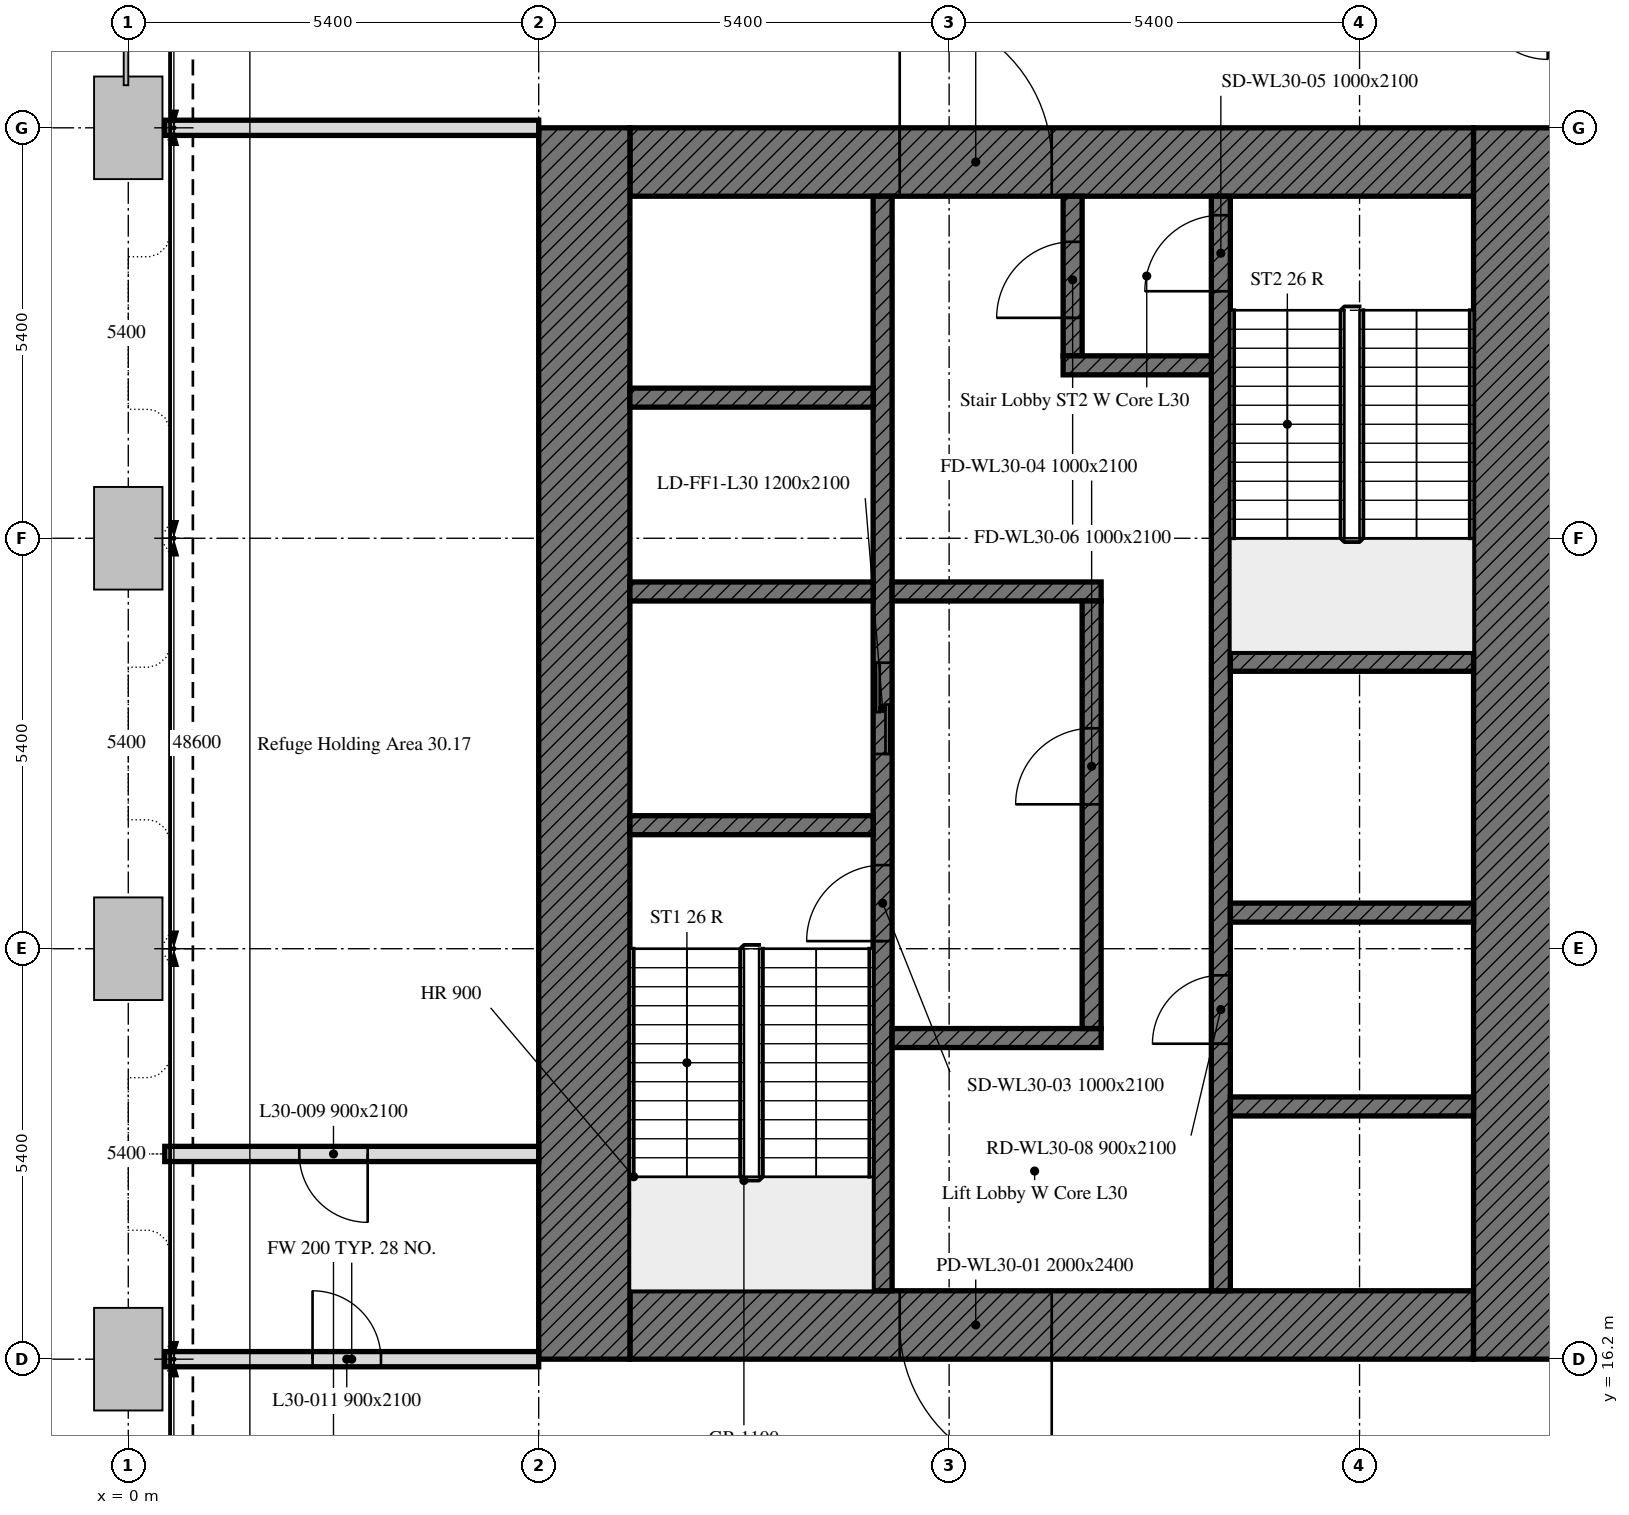
"""IFC4 building model, lengths in metres.
Left out: names, types, materials, properties, quantities, classifications, styles, units other than length and angle.
Written with IfcOpenShell. Run it as: python <this file> out.ifc"""

import sys

from ifc_helpers import new_model, si_unit, direction, frame, frame_2d, origin, place, context, subcontext, project, spatial, rectangle, extrude, element, fill, save


model = new_model("IFC4")
c1 = context("Model", 3, precision=1e-05, world=origin(), true_north=direction((0.0, 1.0)))
c2 = subcontext(c1, "Body", "Model", "MODEL_VIEW")
j1 = project(units=[si_unit("LENGTHUNIT", "METRE"), si_unit("PLANEANGLEUNIT", "RADIAN")], contexts=[c1])
p1 = place(None, origin())
s1 = spatial("IfcSite", under=j1, at=p1, CompositionType="ELEMENT")
p2 = place(p1, origin())
s2 = spatial("IfcBuilding", under=s1, at=p2, CompositionType="ELEMENT")
p3 = place(p2, frame((0.0, 0.0, 125.8)))
s3 = spatial("IfcBuildingStorey", under=s2, at=p3, CompositionType="ELEMENT", Elevation=125.8)
p4 = place(p3, frame((17.7, 16.65, 0.0), z_axis=(0.0, 0.0, 1.0), x_axis=(-1.0, 0.0, 0.0)))
e1 = element("IfcWall", 1, at=p4, inside=s3, PredefinedType="SOLIDWALL", context=c2, shape_type="SweptSolid", body=[
    extrude(rectangle(XDim=11.1, YDim=0.9, at=frame_2d((5.55, 0.0))), origin(), (0.0, 0.0, 1.0), 4.5),
])
p5 = place(p4, frame((5.55, 0.0, 0.0)))
e2 = element("IfcOpeningElement", 2, at=p5, cuts=e1, PredefinedType="OPENING", context=c2, shape_type="SweptSolid", body=[
    extrude(rectangle(XDim=2.0, YDim=2.4, at=frame_2d((1.0, 1.2))), frame((0.0, 0.45, 0.0), z_axis=(0.0, -1.0, 0.0), x_axis=(1.0, 0.0, 0.0)), (0.0, 0.0, 1.0), 0.9),
])
p6 = place(p3, frame((6.6, 31.95, 0.0), z_axis=(0.0, 0.0, 1.0), x_axis=(1.0, 0.0, 0.0)))
e3 = element("IfcWall", 3, at=p6, inside=s3, PredefinedType="SOLIDWALL", context=c2, shape_type="SweptSolid", body=[
    extrude(rectangle(XDim=11.1, YDim=0.9, at=frame_2d((5.55, 0.0))), origin(), (0.0, 0.0, 1.0), 4.5),
])
p7 = place(p6, frame((3.55, 0.0, 0.0)))
e4 = element("IfcOpeningElement", 4, at=p7, cuts=e3, PredefinedType="OPENING", context=c2, shape_type="SweptSolid", body=[
    extrude(rectangle(XDim=2.0, YDim=2.4, at=frame_2d((1.0, 1.2))), frame((0.0, 0.45, 0.0), z_axis=(0.0, -1.0, 0.0), x_axis=(1.0, 0.0, 0.0)), (0.0, 0.0, 1.0), 0.9),
])
for number, where, z_axis, x_axis in (
    (5, (6.0, 16.2, 0.0), (0.0, 0.0, 1.0), (0.0, 1.0, 0.0)),
    (6, (18.3, 32.4, 0.0), (0.0, 0.0, 1.0), (0.0, -1.0, 0.0)),
):
    element("IfcWall", number, at=place(p3, frame(where, z_axis=z_axis, x_axis=x_axis)), inside=s3, PredefinedType="SOLIDWALL", context=c2, shape_type="SweptSolid", body=[
        extrude(rectangle(XDim=16.2, YDim=1.2, at=frame_2d((8.1, 0.0))), origin(), (0.0, 0.0, 1.0), 4.5),
    ])
p8 = place(p3, frame((9.925, 17.1, 0.0), z_axis=(0.0, 0.0, 1.0), x_axis=(0.0, 1.0, 0.0)))
e7 = element("IfcWall", 7, at=p8, inside=s3, PredefinedType="SOLIDWALL", context=c2, shape_type="SweptSolid", body=[
    extrude(rectangle(XDim=14.4, YDim=0.25, at=frame_2d((7.2, 0.0))), origin(), (0.0, 0.0, 1.0), 4.5),
])
p9 = place(p8, frame((4.6, 0.0, 0.0)))
e8 = element("IfcOpeningElement", 8, at=p9, cuts=e7, PredefinedType="OPENING", context=c2, shape_type="SweptSolid", body=[
    extrude(rectangle(XDim=1.0, YDim=2.1, at=frame_2d((0.5, 1.05))), frame((0.0, 0.125, 0.0), z_axis=(0.0, -1.0, 0.0), x_axis=(1.0, 0.0, 0.0)), (0.0, 0.0, 1.0), 0.25),
])
p10 = place(p8, frame((7.062, 0.0, 0.0)))
e9 = element("IfcOpeningElement", 9, at=p10, cuts=e7, PredefinedType="OPENING", context=c2, shape_type="SweptSolid", body=[
    extrude(rectangle(XDim=1.2, YDim=2.1, at=frame_2d((0.6, 1.05))), frame((0.0, 0.125, 0.0), z_axis=(0.0, -1.0, 0.0), x_axis=(1.0, 0.0, 0.0)), (0.0, 0.0, 1.0), 0.25),
])
p11 = place(p3, frame((14.375, 17.1, 0.0), z_axis=(0.0, 0.0, 1.0), x_axis=(0.0, 1.0, 0.0)))
e10 = element("IfcWall", 10, at=p11, inside=s3, PredefinedType="SOLIDWALL", context=c2, shape_type="SweptSolid", body=[
    extrude(rectangle(XDim=14.4, YDim=0.25, at=frame_2d((7.2, 0.0))), origin(), (0.0, 0.0, 1.0), 4.5),
])
p12 = place(p11, frame((13.15, 0.0, 0.0)))
e11 = element("IfcOpeningElement", 11, at=p12, cuts=e10, PredefinedType="OPENING", context=c2, shape_type="SweptSolid", body=[
    extrude(rectangle(XDim=1.0, YDim=2.1, at=frame_2d((0.5, 1.05))), frame((0.0, 0.125, 0.0), z_axis=(0.0, -1.0, 0.0), x_axis=(1.0, 0.0, 0.0)), (0.0, 0.0, 1.0), 0.25),
])
p13 = place(p11, frame((3.25, 0.0, 0.0)))
e12 = element("IfcOpeningElement", 12, at=p13, cuts=e10, PredefinedType="OPENING", context=c2, shape_type="SweptSolid", body=[
    extrude(rectangle(XDim=0.9, YDim=2.1, at=frame_2d((0.45, 1.05))), frame((0.0, 0.125, 0.0), z_axis=(0.0, -1.0, 0.0), x_axis=(1.0, 0.0, 0.0)), (0.0, 0.0, 1.0), 0.25),
])
for number, where, z_axis, x_axis in (
    (13, (6.6, 23.225, 0.0), (0.0, 0.0, 1.0), (1.0, 0.0, 0.0)),
    (14, (14.5, 25.375, 0.0), (0.0, 0.0, 1.0), (1.0, 0.0, 0.0)),
    (15, (14.5, 22.075, 0.0), (0.0, 0.0, 1.0), (1.0, 0.0, 0.0)),
    (16, (6.6, 26.3, 0.0), (0.0, 0.0, 1.0), (1.0, 0.0, 0.0)),
):
    element("IfcWall", number, at=place(p3, frame(where, z_axis=z_axis, x_axis=x_axis)), inside=s3, PredefinedType="SOLIDWALL", context=c2, shape_type="SweptSolid", body=[
        extrude(rectangle(XDim=3.2, YDim=0.25, at=frame_2d((1.6, 0.0))), origin(), (0.0, 0.0, 1.0), 4.5),
    ])
for number, where, z_axis, x_axis in (
    (17, (10.05, 26.3, 0.0), (0.0, 0.0, 1.0), (1.0, 0.0, 0.0)),
    (18, (10.05, 20.425, 0.0), (0.0, 0.0, 1.0), (1.0, 0.0, 0.0)),
):
    element("IfcWall", number, at=place(p3, frame(where, z_axis=z_axis, x_axis=x_axis)), inside=s3, PredefinedType="SOLIDWALL", context=c2, shape_type="SweptSolid", body=[
        extrude(rectangle(XDim=2.75, YDim=0.25, at=frame_2d((1.375, 0.0))), origin(), (0.0, 0.0, 1.0), 4.5),
    ])
p14 = place(p3, frame((12.425, 29.4, 0.0), z_axis=(0.0, 0.0, 1.0), x_axis=(0.0, 1.0, 0.0)))
e19 = element("IfcWall", 19, at=p14, inside=s3, PredefinedType="SOLIDWALL", context=c2, shape_type="SweptSolid", body=[
    extrude(rectangle(XDim=2.1, YDim=0.25, at=frame_2d((1.05, 0.0))), origin(), (0.0, 0.0, 1.0), 4.5),
])
p15 = place(p14, frame((0.5, 0.0, 0.0)))
e20 = element("IfcOpeningElement", 20, at=p15, cuts=e19, PredefinedType="OPENING", context=c2, shape_type="SweptSolid", body=[
    extrude(rectangle(XDim=1.0, YDim=2.1, at=frame_2d((0.5, 1.05))), frame((0.0, 0.125, 0.0), z_axis=(0.0, -1.0, 0.0), x_axis=(1.0, 0.0, 0.0)), (0.0, 0.0, 1.0), 0.25),
])
p16 = place(p3, frame((12.3, 29.275, 0.0), z_axis=(0.0, 0.0, 1.0), x_axis=(1.0, 0.0, 0.0)))
e21 = element("IfcWall", 21, at=p16, inside=s3, PredefinedType="SOLIDWALL", context=c2, shape_type="SweptSolid", body=[
    extrude(rectangle(XDim=1.95, YDim=0.25, at=frame_2d((0.975, 0.0))), origin(), (0.0, 0.0, 1.0), 4.5),
])
p17 = place(p3, frame((12.675, 20.55, 0.0), z_axis=(0.0, 0.0, 1.0), x_axis=(0.0, 1.0, 0.0)))
e22 = element("IfcWall", 22, at=p17, inside=s3, PredefinedType="SOLIDWALL", context=c2, shape_type="SweptSolid", body=[
    extrude(rectangle(XDim=5.625, YDim=0.25, at=frame_2d((2.812, 0.0))), origin(), (0.0, 0.0, 1.0), 4.5),
])
p18 = place(p17, frame((2.95, 0.0, 0.0)))
e23 = element("IfcOpeningElement", 23, at=p18, cuts=e22, PredefinedType="OPENING", context=c2, shape_type="SweptSolid", body=[
    extrude(rectangle(XDim=1.0, YDim=2.1, at=frame_2d((0.5, 1.05))), frame((0.0, 0.125, 0.0), z_axis=(0.0, -1.0, 0.0), x_axis=(1.0, 0.0, 0.0)), (0.0, 0.0, 1.0), 0.25),
])
for number, where, z_axis, x_axis in (
    (24, (6.6, 28.85, 0.0), (0.0, 0.0, 1.0), (1.0, 0.0, 0.0)),
    (25, (14.5, 19.525, 0.0), (0.0, 0.0, 1.0), (1.0, 0.0, 0.0)),
):
    element("IfcWall", number, at=place(p3, frame(where, z_axis=z_axis, x_axis=x_axis)), inside=s3, PredefinedType="SOLIDWALL", context=c2, shape_type="SweptSolid", body=[
        extrude(rectangle(XDim=3.2, YDim=0.25, at=frame_2d((1.6, 0.0))), origin(), (0.0, 0.0, 1.0), 4.5),
    ])
p19 = place(p3, frame((0.48, 16.2, 0.0), z_axis=(0.0, 0.0, 1.0), x_axis=(1.0, 0.0, 0.0)))
e26 = element("IfcWall", 26, at=p19, inside=s3, PredefinedType="PARTITIONING", context=c2, shape_type="SweptSolid", body=[
    extrude(rectangle(XDim=4.92, YDim=0.2, at=frame_2d((2.46, 0.0))), origin(), (0.0, 0.0, 1.0), 3.75),
])
p20 = place(p19, frame((1.945, 0.0, 0.0)))
e27 = element("IfcOpeningElement", 27, at=p20, cuts=e26, PredefinedType="OPENING", context=c2, shape_type="SweptSolid", body=[
    extrude(rectangle(XDim=0.9, YDim=2.1, at=frame_2d((0.45, 1.05))), frame((0.0, 0.1, 0.0), z_axis=(0.0, -1.0, 0.0), x_axis=(1.0, 0.0, 0.0)), (0.0, 0.0, 1.0), 0.2),
])
p21 = place(p3, frame((0.48, 32.4, 0.0), z_axis=(0.0, 0.0, 1.0), x_axis=(1.0, 0.0, 0.0)))
e28 = element("IfcWall", 28, at=p21, inside=s3, PredefinedType="PARTITIONING", context=c2, shape_type="SweptSolid", body=[
    extrude(rectangle(XDim=4.92, YDim=0.2, at=frame_2d((2.46, 0.0))), origin(), (0.0, 0.0, 1.0), 3.75),
])
p22 = place(p3, frame((5.4, 18.9, 0.0), z_axis=(0.0, 0.0, 1.0), x_axis=(-1.0, 0.0, 0.0)))
e29 = element("IfcWall", 29, at=p22, inside=s3, PredefinedType="PARTITIONING", context=c2, shape_type="SweptSolid", body=[
    extrude(rectangle(XDim=4.92, YDim=0.2, at=frame_2d((2.46, 0.0))), origin(), (0.0, 0.0, 1.0), 4.5),
])
p23 = place(p22, frame((2.25, 0.0, 0.0)))
e30 = element("IfcOpeningElement", 30, at=p23, cuts=e29, PredefinedType="OPENING", context=c2, shape_type="SweptSolid", body=[
    extrude(rectangle(XDim=0.9, YDim=2.1, at=frame_2d((0.45, 1.05))), frame((0.0, 0.1, 0.0), z_axis=(0.0, -1.0, 0.0), x_axis=(1.0, 0.0, 0.0)), (0.0, 0.0, 1.0), 0.2),
])
p24 = place(p5, origin())
e31 = element("IfcDoor", 31, at=p24, inside=s3, OperationType="DOUBLE_DOOR_SINGLE_SWING", PredefinedType="DOOR", context=c2, shape_type="SweptSolid", body=[
    extrude(rectangle(XDim=2.0, YDim=2.4, at=frame_2d((1.0, 1.2))), frame((0.0, 0.025, 0.0), z_axis=(0.0, -1.0, 0.0), x_axis=(1.0, 0.0, 0.0)), (0.0, 0.0, 1.0), 0.05),
])
fill(e2, e31)
p25 = place(p7, origin())
e32 = element("IfcDoor", 32, at=p25, inside=s3, OperationType="DOUBLE_DOOR_SINGLE_SWING", PredefinedType="DOOR", context=c2, shape_type="SweptSolid", body=[
    extrude(rectangle(XDim=2.0, YDim=2.4, at=frame_2d((1.0, 1.2))), frame((0.0, 0.025, 0.0), z_axis=(0.0, -1.0, 0.0), x_axis=(1.0, 0.0, 0.0)), (0.0, 0.0, 1.0), 0.05),
])
fill(e4, e32)
p26 = place(p9, origin())
e33 = element("IfcDoor", 33, at=p26, inside=s3, OperationType="SINGLE_SWING_LEFT", PredefinedType="DOOR", context=c2, shape_type="SweptSolid", body=[
    extrude(rectangle(XDim=1.0, YDim=2.1, at=frame_2d((0.5, 1.05))), frame((0.0, 0.025, 0.0), z_axis=(0.0, -1.0, 0.0), x_axis=(1.0, 0.0, 0.0)), (0.0, 0.0, 1.0), 0.05),
])
fill(e8, e33)
p27 = place(p18, origin())
e34 = element("IfcDoor", 34, at=p27, inside=s3, OperationType="SINGLE_SWING_LEFT", PredefinedType="DOOR", context=c2, shape_type="SweptSolid", body=[
    extrude(rectangle(XDim=1.0, YDim=2.1, at=frame_2d((0.5, 1.05))), frame((0.0, 0.025, 0.0), z_axis=(0.0, -1.0, 0.0), x_axis=(1.0, 0.0, 0.0)), (0.0, 0.0, 1.0), 0.05),
])
fill(e23, e34)
p28 = place(p12, origin())
e35 = element("IfcDoor", 35, at=p28, inside=s3, OperationType="SINGLE_SWING_LEFT", PredefinedType="DOOR", context=c2, shape_type="SweptSolid", body=[
    extrude(rectangle(XDim=1.0, YDim=2.1, at=frame_2d((0.5, 1.05))), frame((0.0, 0.025, 0.0), z_axis=(0.0, -1.0, 0.0), x_axis=(1.0, 0.0, 0.0)), (0.0, 0.0, 1.0), 0.05),
])
fill(e11, e35)
p29 = place(p15, origin())
e36 = element("IfcDoor", 36, at=p29, inside=s3, OperationType="SINGLE_SWING_LEFT", PredefinedType="DOOR", context=c2, shape_type="SweptSolid", body=[
    extrude(rectangle(XDim=1.0, YDim=2.1, at=frame_2d((0.5, 1.05))), frame((0.0, 0.025, 0.0), z_axis=(0.0, -1.0, 0.0), x_axis=(1.0, 0.0, 0.0)), (0.0, 0.0, 1.0), 0.05),
])
fill(e20, e36)
p30 = place(p10, origin())
e37 = element("IfcDoor", 37, at=p30, inside=s3, OperationType="DOUBLE_DOOR_SLIDING", PredefinedType="DOOR", context=c2, shape_type="SweptSolid", body=[
    extrude(rectangle(XDim=1.2, YDim=2.1, at=frame_2d((0.6, 1.05))), frame((0.0, 0.025, 0.0), z_axis=(0.0, -1.0, 0.0), x_axis=(1.0, 0.0, 0.0)), (0.0, 0.0, 1.0), 0.05),
])
fill(e9, e37)
p31 = place(p13, origin())
e38 = element("IfcDoor", 38, at=p31, inside=s3, OperationType="SINGLE_SWING_LEFT", PredefinedType="DOOR", context=c2, shape_type="SweptSolid", body=[
    extrude(rectangle(XDim=0.9, YDim=2.1, at=frame_2d((0.45, 1.05))), frame((0.0, 0.025, 0.0), z_axis=(0.0, -1.0, 0.0), x_axis=(1.0, 0.0, 0.0)), (0.0, 0.0, 1.0), 0.05),
])
fill(e12, e38)
p32 = place(p23, origin())
e39 = element("IfcDoor", 39, at=p32, inside=s3, OperationType="SINGLE_SWING_RIGHT", PredefinedType="DOOR", context=c2, shape_type="SweptSolid", body=[
    extrude(rectangle(XDim=0.9, YDim=2.1, at=frame_2d((0.45, 1.05))), frame((0.0, 0.025, 0.0), z_axis=(0.0, -1.0, 0.0), x_axis=(1.0, 0.0, 0.0)), (0.0, 0.0, 1.0), 0.05),
])
fill(e30, e39)
p33 = place(p20, origin())
e40 = element("IfcDoor", 40, at=p33, inside=s3, OperationType="SINGLE_SWING_RIGHT", PredefinedType="DOOR", context=c2, shape_type="SweptSolid", body=[
    extrude(rectangle(XDim=0.9, YDim=2.1, at=frame_2d((0.45, 1.05))), frame((0.0, 0.025, 0.0), z_axis=(0.0, -1.0, 0.0), x_axis=(1.0, 0.0, 0.0)), (0.0, 0.0, 1.0), 0.05),
])
fill(e27, e40)
save(model, sys.argv[1])
